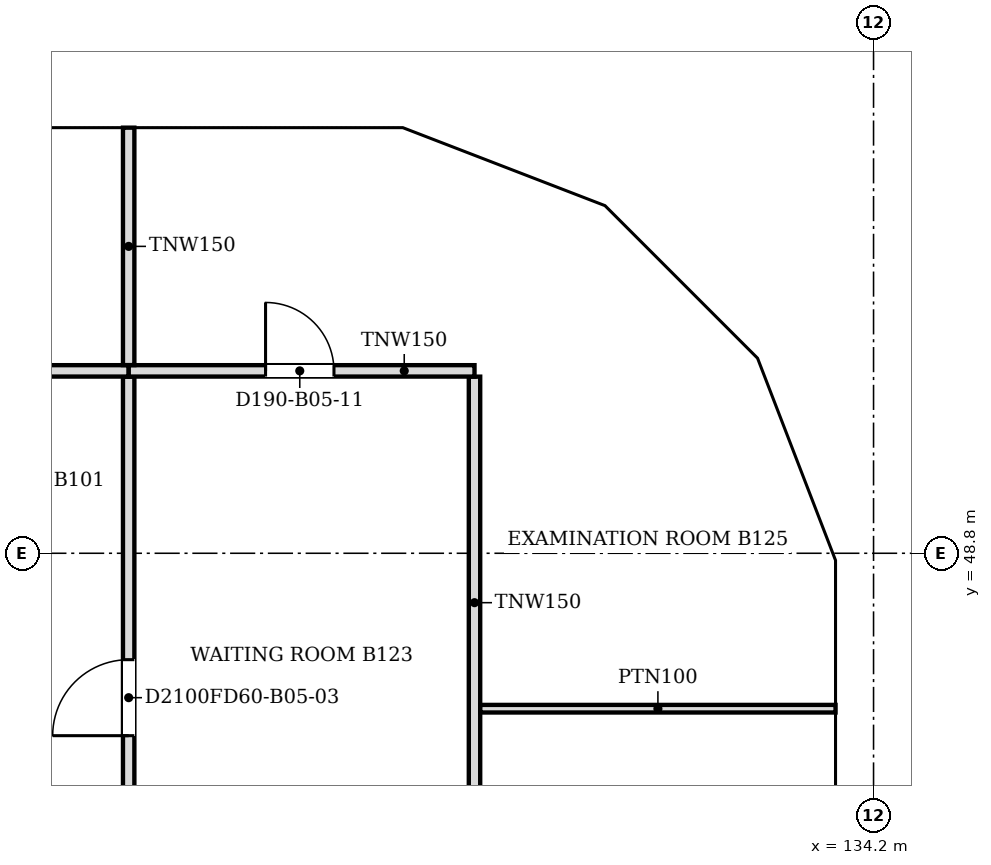
"""IFC4 building model, lengths in metres.
Left out: names, types, materials, properties, quantities, classifications, styles, units other than length and angle.
Written with IfcOpenShell. Run it as: python <this file> out.ifc"""

import sys

from ifc_helpers import new_model, si_unit, direction, frame, frame_2d, origin, place, context, subcontext, project, spatial, polyline, rectangle, outline, extrude, faceted_brep, source, transform, mapped, element, fill, save


model = new_model("IFC4")
c1 = context("Model", 3, precision=1e-05, world=origin(), true_north=direction((0.0, 1.0)))
c2 = subcontext(c1, "Body", "Model", "MODEL_VIEW")
j1 = project(units=[si_unit("LENGTHUNIT", "METRE"), si_unit("PLANEANGLEUNIT", "RADIAN")], contexts=[c1])
p1 = place(None, origin())
s1 = spatial("IfcSite", under=j1, at=p1, CompositionType="ELEMENT")
p2 = place(p1, origin())
s2 = spatial("IfcBuilding", under=s1, at=p2, CompositionType="ELEMENT")
p3 = place(p2, frame((0.0, 0.0, 52.4)))
s3 = spatial("IfcBuildingStorey", under=s2, at=p3, CompositionType="ELEMENT", Elevation=52.4)
m1 = source(origin(), c2, "Body", "Brep", [
    faceted_brep([(3.003, -0.25, 0.0), (3.05, -0.25, 0.06), (3.05, -0.25, 7.54), (3.003, -0.25, 7.6), (0.0, -0.25, 3.8), (0.0, 0.25, 3.8), (2.957, 0.25, 7.541), (2.957, 0.25, 0.059), (3.003, 0.0, 0.0), (3.003, 0.0, 7.6)], [[[0, 1, 2, 3, 4]], [[5, 6, 7]], [[1, 0, 8]], [[9, 3, 2]], [[6, 5, 4, 3, 9]], [[5, 7, 8, 0, 4]], [[1, 8, 7, 6, 9, 2]]]),
])
p4 = place(p3, frame((133.95, 45.75, -3.8), z_axis=(0.0, 0.0, 1.0), x_axis=(0.0, 1.0, 0.0)))
e1 = element("IfcWall", 1, at=p4, inside=s3, PredefinedType="SOLIDWALL", context=c2, shape_type="MappedRepresentation", body=[
    mapped(m1, transform((0.0, 0.0, 0.0), scale=1.0)),
])
m2 = source(origin(), c2, "Body", "SweptSolid", [
    extrude(outline(polyline([(2.803, 6.944), (0.319, 3.8), (2.803, 0.656), (2.803, 6.944)])), frame((0.0, 0.26, 0.0), z_axis=(0.0, -1.0, 0.0), x_axis=(1.0, 0.0, 0.0)), (0.0, 0.0, 1.0), 0.52),
])
p5 = place(p4, origin())
e2 = element("IfcOpeningElement", 2, at=p5, cuts=e1, PredefinedType="OPENING", context=c2, shape_type="MappedRepresentation", body=[
    mapped(m2, transform((0.0, 0.0, 0.0), scale=1.0)),
])
m3 = source(origin(), c2, "Body", "Brep", [
    faceted_brep([(0.047, -0.25, 0.0), (2.997, -0.25, 3.8), (0.047, -0.25, 7.6), (0.0, -0.25, 7.541), (0.0, -0.25, 0.059), (0.093, 0.25, 7.54), (2.944, 0.25, 3.868), (2.944, 0.25, 3.732), (0.093, 0.25, 0.06), (2.997, 0.0, 3.8), (0.047, 0.0, 0.0), (0.047, 0.0, 7.6)], [[[0, 1, 2, 3, 4]], [[5, 6, 7, 8]], [[8, 7, 9, 1, 0, 10]], [[6, 5, 11, 2, 1, 9]], [[3, 2, 11]], [[10, 0, 4]], [[8, 10, 4, 3, 11, 5]], [[9, 7, 6]]]),
])
p6 = place(p3, frame((133.967, 48.71, -3.8), z_axis=(0.0, 0.0, 1.0), x_axis=(-0.359901446078, 0.932990326376, 0.0)))
e3 = element("IfcWall", 3, at=p6, inside=s3, PredefinedType="SOLIDWALL", context=c2, shape_type="MappedRepresentation", body=[
    mapped(m3, transform((0.0, 0.0, 0.0), scale=1.0)),
])
m4 = source(origin(), c2, "Body", "SweptSolid", [
    extrude(outline(polyline([(0.247, 0.665), (2.681, 3.8), (0.247, 6.935), (0.247, 0.665)])), frame((0.0, 0.26, 0.0), z_axis=(0.0, -1.0, 0.0), x_axis=(1.0, 0.0, 0.0)), (0.0, 0.0, 1.0), 0.52),
])
p7 = place(p6, origin())
e4 = element("IfcOpeningElement", 4, at=p7, cuts=e3, PredefinedType="OPENING", context=c2, shape_type="MappedRepresentation", body=[
    mapped(m4, transform((0.0, 0.0, 0.0), scale=1.0)),
])
m5 = source(origin(), c2, "Body", "Brep", [
    faceted_brep([(2.944, -0.25, 0.0), (2.997, -0.25, 0.068), (2.997, -0.25, 7.532), (2.944, -0.25, 7.6), (0.0, -0.25, 3.8), (0.053, 0.25, 3.868), (2.891, 0.25, 7.532), (2.891, 0.25, 0.068), (0.053, 0.25, 3.731), (2.944, 0.0, 0.0), (2.944, 0.0, 7.6), (0.0, 0.0, 3.8)], [[[0, 1, 2, 3, 4]], [[5, 6, 7, 8]], [[1, 0, 9]], [[10, 3, 2]], [[6, 5, 11, 4, 3, 10]], [[8, 7, 9, 0, 4, 11]], [[8, 11, 5]], [[1, 9, 7, 6, 10, 2]]]),
])
p8 = place(p3, frame((132.888, 51.506, -3.8), z_axis=(0.0, 0.0, 1.0), x_axis=(-0.707147509625, 0.707066050402, 0.0)))
e5 = element("IfcWall", 5, at=p8, inside=s3, PredefinedType="SOLIDWALL", context=c2, shape_type="MappedRepresentation", body=[
    mapped(m5, transform((0.0, 0.0, 0.0), scale=1.0)),
])
m6 = source(origin(), c2, "Body", "SweptSolid", [
    extrude(outline(polyline([(2.744, 6.934), (0.316, 3.8), (2.744, 0.666), (2.744, 6.934)])), frame((0.0, 0.26, 0.0), z_axis=(0.0, -1.0, 0.0), x_axis=(1.0, 0.0, 0.0)), (0.0, 0.0, 1.0), 0.52),
])
p9 = place(p8, origin())
e6 = element("IfcOpeningElement", 6, at=p9, cuts=e5, PredefinedType="OPENING", context=c2, shape_type="MappedRepresentation", body=[
    mapped(m6, transform((0.0, 0.0, 0.0), scale=1.0)),
])
m7 = source(origin(), c2, "Body", "Brep", [
    faceted_brep([(0.053, -0.25, 0.0), (3.003, -0.25, 3.8), (0.053, -0.25, 7.6), (0.0, -0.25, 7.531), (0.0, -0.25, 0.068), (0.106, 0.25, 7.532), (2.957, 0.25, 3.86), (2.957, 0.25, 3.74), (0.106, 0.25, 0.068), (3.003, 0.0, 3.8), (0.053, 0.0, 0.0), (0.053, 0.0, 7.6)], [[[0, 1, 2, 3, 4]], [[5, 6, 7, 8]], [[8, 7, 9, 1, 0, 10]], [[6, 5, 11, 2, 1, 9]], [[3, 2, 11]], [[10, 0, 4]], [[8, 10, 4, 3, 11, 5]], [[9, 7, 6]]]),
])
p10 = place(p3, frame((130.856, 53.569, -3.8), z_axis=(0.0, 0.0, 1.0), x_axis=(-0.933007896601, 0.359855894603, 0.0)))
e7 = element("IfcWall", 7, at=p10, inside=s3, PredefinedType="SOLIDWALL", context=c2, shape_type="MappedRepresentation", body=[
    mapped(m7, transform((0.0, 0.0, 0.0), scale=1.0)),
])
m8 = source(origin(), c2, "Body", "SweptSolid", [
    extrude(outline(polyline([(0.253, 0.665), (2.687, 3.8), (0.253, 6.935), (0.253, 0.665)])), frame((0.0, 0.26, 0.0), z_axis=(0.0, -1.0, 0.0), x_axis=(1.0, 0.0, 0.0)), (0.0, 0.0, 1.0), 0.52),
])
p11 = place(p10, origin())
e8 = element("IfcOpeningElement", 8, at=p11, cuts=e7, PredefinedType="OPENING", context=c2, shape_type="MappedRepresentation", body=[
    mapped(m8, transform((0.0, 0.0, 0.0), scale=1.0)),
])
m9 = source(origin(), c2, "Body", "Brep", [
    faceted_brep([(3.003, -0.25, 0.0), (6.053, -0.25, 3.8), (3.003, -0.25, 7.6), (0.0, -0.25, 3.8), (0.047, 0.25, 3.859), (3.003, 0.25, 7.6), (6.053, 0.25, 3.8), (3.003, 0.25, 0.0), (0.047, 0.25, 3.741), (0.0, 0.0, 3.8)], [[[0, 1, 2, 3]], [[4, 5, 6, 7, 8]], [[7, 6, 1, 0]], [[6, 5, 2, 1]], [[5, 4, 9, 3, 2]], [[8, 7, 0, 3, 9]], [[8, 9, 4]]]),
])
p12 = place(p3, frame((128.053, 54.65, -3.8), z_axis=(0.0, 0.0, 1.0), x_axis=(-1.0, 0.0, 0.0)))
e9 = element("IfcWall", 9, at=p12, inside=s3, PredefinedType="SOLIDWALL", context=c2, shape_type="MappedRepresentation", body=[
    mapped(m9, transform((0.0, 0.0, 0.0), scale=1.0)),
])
m10 = source(origin(), c2, "Body", "SweptSolid", [
    extrude(outline(polyline([(3.005, 0.401), (5.733, 3.8), (3.005, 7.199), (0.319, 3.8), (3.005, 0.401)])), frame((0.0, 0.26, 0.0), z_axis=(0.0, -1.0, 0.0), x_axis=(1.0, 0.0, 0.0)), (0.0, 0.0, 1.0), 0.52),
])
p13 = place(p12, origin())
e10 = element("IfcOpeningElement", 10, at=p13, cuts=e9, PredefinedType="OPENING", context=c2, shape_type="MappedRepresentation", body=[
    mapped(m10, transform((0.0, 0.0, 0.0), scale=1.0)),
])
p14 = place(p2, frame((0.0, 0.0, 56.2)))
s4 = spatial("IfcBuildingStorey", under=s2, at=p14, CompositionType="ELEMENT", Elevation=56.2)
m11 = source(origin(), c2, "Body", "Brep", [
    faceted_brep([(3.05, -0.25, 0.0), (6.053, -0.25, 3.8), (3.05, -0.25, 7.6), (0.0, -0.25, 3.8), (0.0, 0.25, 3.8), (3.05, 0.25, 7.6), (6.007, 0.25, 3.859), (6.007, 0.25, 3.741), (3.05, 0.25, 0.0), (6.053, 0.0, 3.8)], [[[0, 1, 2, 3]], [[4, 5, 6, 7, 8]], [[8, 7, 9, 1, 0]], [[6, 5, 2, 1, 9]], [[5, 4, 3, 2]], [[4, 8, 0, 3]], [[9, 7, 6]]]),
])
p15 = place(p14, frame((133.95, 42.7, -3.8), z_axis=(0.0, 0.0, 1.0), x_axis=(0.0, 1.0, 0.0)))
e11 = element("IfcWall", 11, at=p15, inside=s4, PredefinedType="SOLIDWALL", context=c2, shape_type="MappedRepresentation", body=[
    mapped(m11, transform((0.0, 0.0, 0.0), scale=1.0)),
])
m12 = source(origin(), c2, "Body", "SweptSolid", [
    extrude(outline(polyline([(3.049, 0.401), (5.735, 3.8), (3.049, 7.199), (0.321, 3.8), (3.049, 0.401)])), frame((0.0, 0.26, 0.0), z_axis=(0.0, -1.0, 0.0), x_axis=(1.0, 0.0, 0.0)), (0.0, 0.0, 1.0), 0.52),
])
p16 = place(p15, origin())
e12 = element("IfcOpeningElement", 12, at=p16, cuts=e11, PredefinedType="OPENING", context=c2, shape_type="MappedRepresentation", body=[
    mapped(m12, transform((0.0, 0.0, 0.0), scale=1.0)),
])
m13 = source(origin(), c2, "Body", "Brep", [
    faceted_brep([(2.95, -0.25, 0.0), (3.003, -0.25, 0.068), (3.003, -0.25, 7.532), (2.95, -0.25, 7.6), (0.0, -0.25, 3.8), (0.047, 0.25, 3.86), (2.898, 0.25, 7.532), (2.898, 0.25, 0.068), (0.047, 0.25, 3.74), (2.95, 0.0, 0.0), (2.95, 0.0, 7.6), (0.0, 0.0, 3.8)], [[[0, 1, 2, 3, 4]], [[5, 6, 7, 8]], [[1, 0, 9]], [[10, 3, 2]], [[6, 5, 11, 4, 3, 10]], [[8, 7, 9, 0, 4, 11]], [[8, 11, 5]], [[1, 9, 7, 6, 10, 2]]]),
])
p17 = place(p14, frame((133.95, 48.753, -3.8), z_axis=(0.0, 0.0, 1.0), x_axis=(-0.359855894603, 0.933007896601, 0.0)))
e13 = element("IfcWall", 13, at=p17, inside=s4, PredefinedType="SOLIDWALL", context=c2, shape_type="MappedRepresentation", body=[
    mapped(m13, transform((0.0, 0.0, 0.0), scale=1.0)),
])
m14 = source(origin(), c2, "Body", "SweptSolid", [
    extrude(outline(polyline([(2.75, 6.935), (0.316, 3.8), (2.75, 0.665), (2.75, 6.935)])), frame((0.0, 0.26, 0.0), z_axis=(0.0, -1.0, 0.0), x_axis=(1.0, 0.0, 0.0)), (0.0, 0.0, 1.0), 0.52),
])
p18 = place(p17, origin())
e14 = element("IfcOpeningElement", 14, at=p18, cuts=e13, PredefinedType="OPENING", context=c2, shape_type="MappedRepresentation", body=[
    mapped(m14, transform((0.0, 0.0, 0.0), scale=1.0)),
])
m15 = source(origin(), c2, "Body", "Brep", [
    faceted_brep([(0.053, -0.25, 0.0), (2.997, -0.25, 3.8), (0.053, -0.25, 7.6), (0.0, -0.25, 7.532), (0.0, -0.25, 0.068), (0.106, 0.25, 7.532), (2.944, 0.25, 3.868), (2.944, 0.25, 3.732), (0.106, 0.25, 0.068), (2.997, 0.0, 3.8), (0.053, 0.0, 0.0), (0.053, 0.0, 7.6)], [[[0, 1, 2, 3, 4]], [[5, 6, 7, 8]], [[8, 7, 9, 1, 0, 10]], [[6, 5, 11, 2, 1, 9]], [[3, 2, 11]], [[10, 0, 4]], [[8, 10, 4, 3, 11, 5]], [[9, 7, 6]]]),
])
p19 = place(p14, frame((132.926, 51.469, -3.8), z_axis=(0.0, 0.0, 1.0), x_axis=(-0.707066050402, 0.707147509625, 0.0)))
e15 = element("IfcWall", 15, at=p19, inside=s4, PredefinedType="SOLIDWALL", context=c2, shape_type="MappedRepresentation", body=[
    mapped(m15, transform((0.0, 0.0, 0.0), scale=1.0)),
])
m16 = source(origin(), c2, "Body", "SweptSolid", [
    extrude(outline(polyline([(0.253, 0.667), (2.681, 3.8), (0.253, 6.934), (0.253, 0.667)])), frame((0.0, 0.26, 0.0), z_axis=(0.0, -1.0, 0.0), x_axis=(1.0, 0.0, 0.0)), (0.0, 0.0, 1.0), 0.52),
])
p20 = place(p19, origin())
e16 = element("IfcOpeningElement", 16, at=p20, cuts=e15, PredefinedType="OPENING", context=c2, shape_type="MappedRepresentation", body=[
    mapped(m16, transform((0.0, 0.0, 0.0), scale=1.0)),
])
m17 = source(origin(), c2, "Body", "Brep", [
    faceted_brep([(2.95, -0.25, 0.0), (2.997, -0.25, 0.059), (2.997, -0.25, 7.541), (2.95, -0.25, 7.6), (0.0, -0.25, 3.8), (0.053, 0.25, 3.868), (2.904, 0.25, 7.54), (2.904, 0.25, 0.06), (0.053, 0.25, 3.732), (2.95, 0.0, 0.0), (2.95, 0.0, 7.6), (0.0, 0.0, 3.8)], [[[0, 1, 2, 3, 4]], [[5, 6, 7, 8]], [[1, 0, 9]], [[10, 3, 2]], [[6, 5, 11, 4, 3, 10]], [[8, 7, 9, 0, 4, 11]], [[8, 11, 5]], [[1, 9, 7, 6, 10, 2]]]),
])
p21 = place(p14, frame((130.806, 53.588, -3.8), z_axis=(0.0, 0.0, 1.0), x_axis=(-0.932990326376, 0.359901446078, 0.0)))
e17 = element("IfcWall", 17, at=p21, inside=s4, PredefinedType="SOLIDWALL", context=c2, shape_type="MappedRepresentation", body=[
    mapped(m17, transform((0.0, 0.0, 0.0), scale=1.0)),
])
p22 = place(p21, origin())
e18 = element("IfcOpeningElement", 18, at=p22, cuts=e17, PredefinedType="OPENING", context=c2, shape_type="MappedRepresentation", body=[
    mapped(m14, transform((0.0, 0.0, 0.0), scale=1.0)),
])
m18 = source(origin(), c2, "Body", "Brep", [
    faceted_brep([(0.047, -0.25, 0.0), (3.05, -0.25, 3.8), (0.047, -0.25, 7.6), (0.0, -0.25, 7.54), (0.0, -0.25, 0.06), (0.093, 0.25, 7.541), (3.05, 0.25, 3.8), (0.093, 0.25, 0.059), (0.047, 0.0, 0.0), (0.047, 0.0, 7.6)], [[[0, 1, 2, 3, 4]], [[5, 6, 7]], [[7, 6, 1, 0, 8]], [[6, 5, 9, 2, 1]], [[3, 2, 9]], [[8, 0, 4]], [[7, 8, 4, 3, 9, 5]]]),
])
p23 = place(p14, frame((128.1, 54.65, -3.8), z_axis=(0.0, 0.0, 1.0), x_axis=(-1.0, 0.0, 0.0)))
e19 = element("IfcWall", 19, at=p23, inside=s4, PredefinedType="SOLIDWALL", context=c2, shape_type="MappedRepresentation", body=[
    mapped(m18, transform((0.0, 0.0, 0.0), scale=1.0)),
])
m19 = source(origin(), c2, "Body", "SweptSolid", [
    extrude(outline(polyline([(0.247, 0.656), (2.731, 3.8), (0.247, 6.944), (0.247, 0.656)])), frame((0.0, 0.26, 0.0), z_axis=(0.0, -1.0, 0.0), x_axis=(1.0, 0.0, 0.0)), (0.0, 0.0, 1.0), 0.52),
])
p24 = place(p23, origin())
e20 = element("IfcOpeningElement", 20, at=p24, cuts=e19, PredefinedType="OPENING", context=c2, shape_type="MappedRepresentation", body=[
    mapped(m19, transform((0.0, 0.0, 0.0), scale=1.0)),
])
m20 = source(origin(), c2, "Body", "SweptSolid", [
    extrude(outline(polyline([(3.05, 0.0), (6.1, 3.8), (3.05, 7.6), (0.0, 3.8), (3.05, 0.0)])), frame((0.0, 0.25, 0.0), z_axis=(0.0, -1.0, 0.0), x_axis=(1.0, 0.0, 0.0)), (0.0, 0.0, 1.0), 0.5),
])
p25 = place(p14, frame((125.05, 54.65, -3.8), z_axis=(0.0, 0.0, 1.0), x_axis=(-1.0, 0.0, 0.0)))
e21 = element("IfcWall", 21, at=p25, inside=s4, PredefinedType="SOLIDWALL", context=c2, shape_type="MappedRepresentation", body=[
    mapped(m20, transform((0.0, 0.0, 0.0), scale=1.0)),
])
m21 = source(origin(), c2, "Body", "SweptSolid", [
    extrude(outline(polyline([(3.05, 0.399), (5.78, 3.8), (3.05, 7.201), (0.321, 3.8), (3.05, 0.399)])), frame((0.0, 0.26, 0.0), z_axis=(0.0, -1.0, 0.0), x_axis=(1.0, 0.0, 0.0)), (0.0, 0.0, 1.0), 0.52),
])
p26 = place(p25, origin())
e22 = element("IfcOpeningElement", 22, at=p26, cuts=e21, PredefinedType="OPENING", context=c2, shape_type="MappedRepresentation", body=[
    mapped(m21, transform((0.0, 0.0, 0.0), scale=1.0)),
])
p27 = place(p3, frame((124.4, 51.124, 0.0), z_axis=(0.0, 0.0, 1.0), x_axis=(0.0, -1.0, 0.0)))
e23 = element("IfcWall", 23, at=p27, inside=s3, PredefinedType="PARTITIONING", context=c2, shape_type="SweptSolid", body=[
    extrude(rectangle(XDim=14.524, YDim=0.15, at=frame_2d((7.262, 0.0))), origin(), (0.0, 0.0, 1.0), 3.067),
])
m22 = source(origin(), c2, "Body", "SweptSolid", [
    extrude(rectangle(XDim=1.0, YDim=2.1, at=frame_2d((0.5, 1.05))), frame((0.0, 0.085, 0.0), z_axis=(0.0, -1.0, 0.0), x_axis=(1.0, 0.0, 0.0)), (0.0, 0.0, 1.0), 0.17),
])
p28 = place(p27, frame((3.724, 0.0, 0.0)))
e24 = element("IfcOpeningElement", 24, at=p28, cuts=e23, PredefinedType="OPENING", context=c2, shape_type="MappedRepresentation", body=[
    mapped(m22, transform((0.0, 0.0, 0.0), scale=1.0)),
])
p29 = place(p3, frame((128.95, 51.124, 0.0), z_axis=(0.0, 0.0, 1.0), x_axis=(0.0, -1.0, 0.0)))
e25 = element("IfcWall", 25, at=p29, inside=s3, PredefinedType="PARTITIONING", context=c2, shape_type="SweptSolid", body=[
    extrude(rectangle(XDim=8.448, YDim=0.15, at=frame_2d((4.224, 0.0))), origin(), (0.0, 0.0, 1.0), 3.067),
])
m23 = source(origin(), c2, "Body", "SweptSolid", [
    extrude(rectangle(XDim=0.9, YDim=2.1, at=frame_2d((0.45, 1.05))), frame((0.0, 0.085, 0.0), z_axis=(0.0, -1.0, 0.0), x_axis=(1.0, 0.0, 0.0)), (0.0, 0.0, 1.0), 0.17),
])
p30 = place(p29, frame((5.948, 0.0, 0.0)))
e26 = element("IfcOpeningElement", 26, at=p30, cuts=e25, PredefinedType="OPENING", context=c2, shape_type="MappedRepresentation", body=[
    mapped(m23, transform((0.0, 0.0, 0.0), scale=1.0)),
])
p31 = place(p3, frame((129.026, 46.755, 0.0), z_axis=(0.0, 0.0, 1.0), x_axis=(1.0, 0.0, 0.0)))
e27 = element("IfcWall", 27, at=p31, inside=s3, PredefinedType="PARTITIONING", context=c2, shape_type="SweptSolid", body=[
    extrude(rectangle(XDim=4.674, YDim=0.1, at=frame_2d((2.337, 0.0))), origin(), (0.0, 0.0, 1.0), 3.067),
])
p32 = place(p3, frame((108.5, 51.2, 0.0), z_axis=(0.0, 0.0, 1.0), x_axis=(1.0, 0.0, 0.0)))
e28 = element("IfcWall", 28, at=p32, inside=s3, PredefinedType="PARTITIONING", context=c2, shape_type="SweptSolid", body=[
    extrude(rectangle(XDim=15.9, YDim=0.15, at=frame_2d((7.95, 0.0))), origin(), (0.0, 0.0, 1.0), 3.067),
])
p33 = place(p32, frame((7.4, 0.0, 0.0)))
e29 = element("IfcOpeningElement", 29, at=p33, cuts=e28, PredefinedType="OPENING", context=c2, shape_type="MappedRepresentation", body=[
    mapped(m22, transform((0.0, 0.0, 0.0), scale=1.0)),
])
p34 = place(p3, frame((124.401, 51.2, 0.0), z_axis=(0.0, 0.0, 1.0), x_axis=(1.0, 0.0, 0.0)))
e30 = element("IfcWall", 30, at=p34, inside=s3, PredefinedType="PARTITIONING", context=c2, shape_type="SweptSolid", body=[
    extrude(rectangle(XDim=4.549, YDim=0.15, at=frame_2d((2.274, 0.0))), origin(), (0.0, 0.0, 1.0), 3.067),
])
p35 = place(p34, frame((1.8, 0.0, 0.0)))
e31 = element("IfcOpeningElement", 31, at=p35, cuts=e30, PredefinedType="OPENING", context=c2, shape_type="MappedRepresentation", body=[
    mapped(m23, transform((0.0, 0.0, 0.0), scale=1.0)),
])
p36 = place(p3, frame((124.4, 51.276, 0.0), z_axis=(0.0, 0.0, 1.0), x_axis=(0.0, 1.0, 0.0)))
e32 = element("IfcWall", 32, at=p36, inside=s3, PredefinedType="PARTITIONING", context=c2, shape_type="SweptSolid", body=[
    extrude(rectangle(XDim=3.124, YDim=0.15, at=frame_2d((1.562, 0.0))), origin(), (0.0, 0.0, 1.0), 3.067),
])
m24 = source(origin(), c2, "Body", "SweptSolid", [
    extrude(rectangle(XDim=1.0, YDim=2.1, at=frame_2d((0.5, 1.05))), frame((0.0, 0.025, 0.0), z_axis=(0.0, -1.0, 0.0), x_axis=(1.0, 0.0, 0.0)), (0.0, 0.0, 1.0), 0.05),
])
p37 = place(p28, origin())
e33 = element("IfcDoor", 33, at=p37, inside=s3, OperationType="SINGLE_SWING_RIGHT", PredefinedType="DOOR", context=c2, shape_type="MappedRepresentation", body=[
    mapped(m24, transform((0.0, 0.0, 0.0), scale=1.0)),
])
fill(e24, e33)
m25 = source(origin(), c2, "Body", "SweptSolid", [
    extrude(rectangle(XDim=0.9, YDim=2.1, at=frame_2d((0.45, 1.05))), frame((0.0, 0.025, 0.0), z_axis=(0.0, -1.0, 0.0), x_axis=(1.0, 0.0, 0.0)), (0.0, 0.0, 1.0), 0.05),
])
p38 = place(p35, origin())
e34 = element("IfcDoor", 34, at=p38, inside=s3, OperationType="SINGLE_SWING_LEFT", PredefinedType="DOOR", context=c2, shape_type="MappedRepresentation", body=[
    mapped(m25, transform((0.0, 0.0, 0.0), scale=1.0)),
])
fill(e31, e34)
save(model, sys.argv[1])
